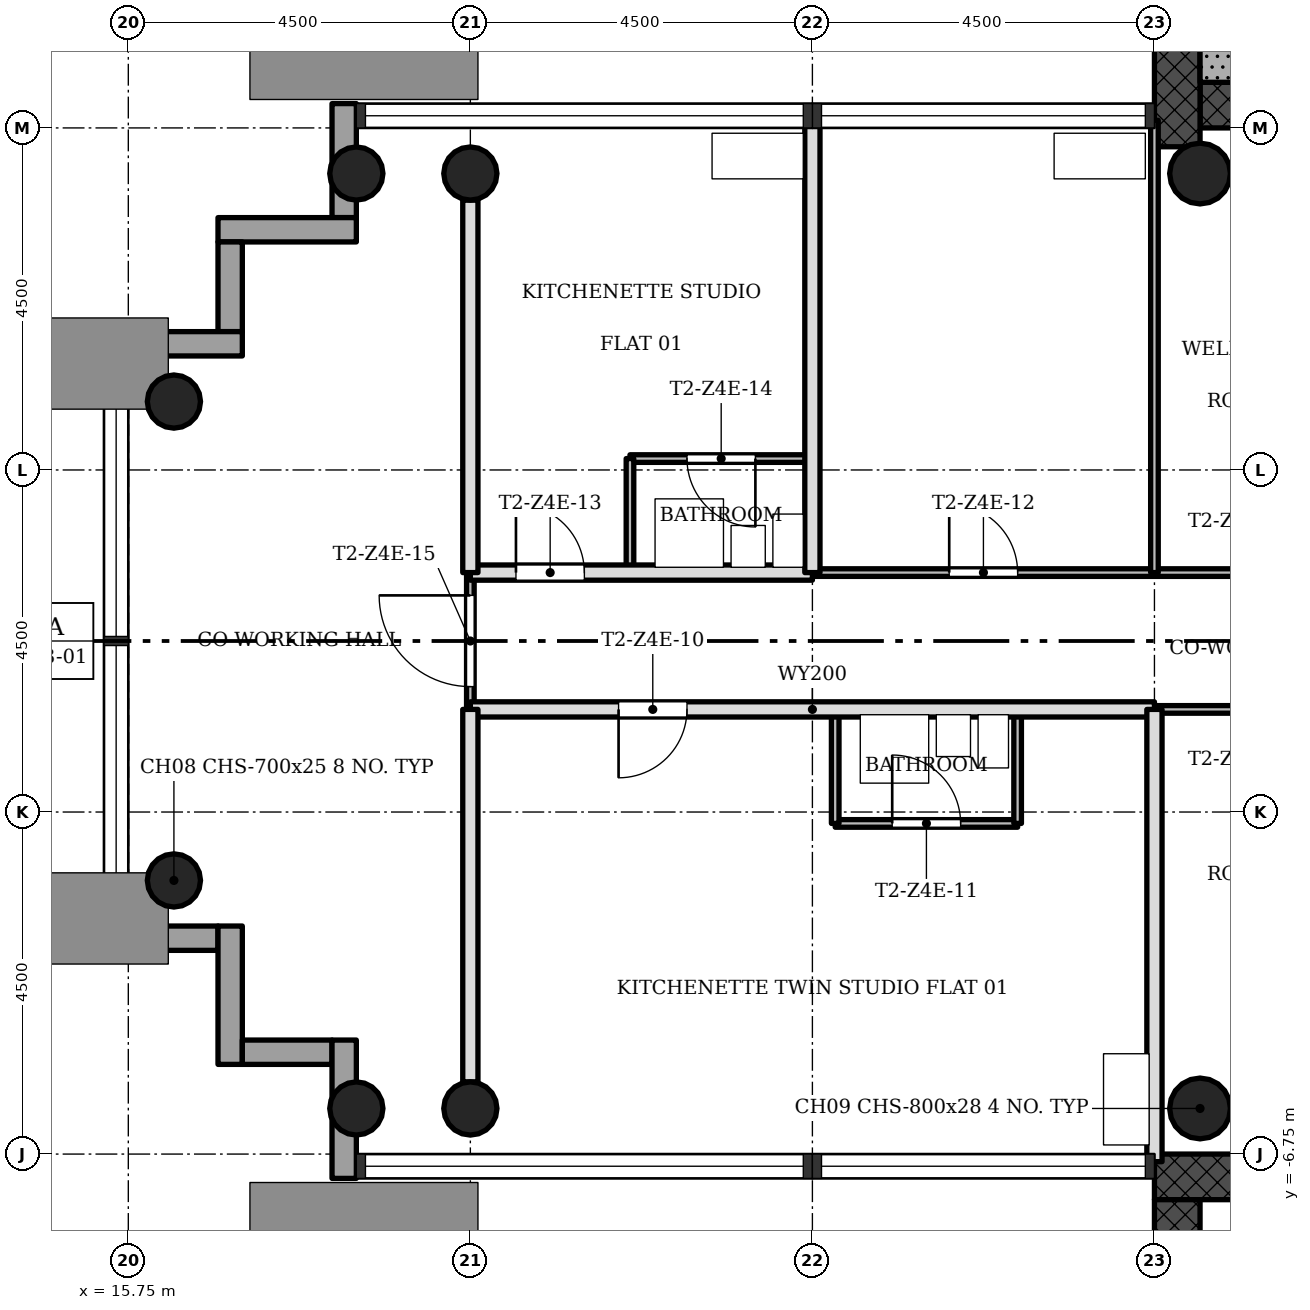
"""IFC4 building model, lengths in metres.
Left out: names, types, materials, properties, quantities, classifications, styles, units other than length and angle.
Written with IfcOpenShell. Run it as: python <this file> out.ifc"""

import sys

from ifc_helpers import new_model, si_unit, direction, frame, frame_2d, origin, origin_2d, place, context, subcontext, project, spatial, rectangle, hollow_circle, extrude, element, fill, save


model = new_model("IFC4")
c1 = context("Model", 3, precision=1e-05, world=origin(), true_north=direction((0.0, 1.0)))
c2 = subcontext(c1, "Body", "Model", "MODEL_VIEW")
j1 = project(units=[si_unit("LENGTHUNIT", "METRE"), si_unit("PLANEANGLEUNIT", "RADIAN")], contexts=[c1])
p1 = place(None, origin())
s1 = spatial("IfcSite", under=j1, at=p1, CompositionType="ELEMENT")
p2 = place(p1, origin())
s2 = spatial("IfcBuilding", under=s1, at=p2, CompositionType="ELEMENT")
p3 = place(p2, frame((0.0, 0.0, 209.6)))
s3 = spatial("IfcBuildingStorey", under=s2, at=p3, CompositionType="ELEMENT", Elevation=209.6)
p4 = place(p3, frame((29.85, 7.05, 0.0), z_axis=(0.0, 0.0, 1.0), x_axis=(1.0, 0.0, 0.0)))
e1 = element("IfcWall", 1, at=p4, inside=s3, PredefinedType="SHEAR", context=c2, shape_type="SweptSolid", body=[
    extrude(rectangle(XDim=12.9, YDim=0.6, at=frame_2d((6.45, 0.0))), origin(), (0.0, 0.0, 1.0), 3.4),
])
p5 = place(p4, frame((5.25, 0.0, 0.0)))
e2 = element("IfcOpeningElement", 2, at=p5, cuts=e1, PredefinedType="OPENING", context=c2, shape_type="SweptSolid", body=[
    extrude(rectangle(XDim=1.8, YDim=2.1, at=frame_2d((0.9, 1.05))), frame((0.0, 0.31, 0.0), z_axis=(0.0, -1.0, 0.0), x_axis=(1.0, 0.0, 0.0)), (0.0, 0.0, 1.0), 0.62),
])
p6 = place(p3, frame((29.55, 15.15, 0.0), z_axis=(0.0, 0.0, 1.0), x_axis=(0.0, -1.0, 0.0)))
e3 = element("IfcWall", 3, at=p6, inside=s3, PredefinedType="SHEAR", context=c2, shape_type="SweptSolid", body=[
    extrude(rectangle(XDim=8.648, YDim=0.6, at=frame_2d((4.324, 0.0))), origin(), (0.0, 0.0, 1.0), 3.4),
])
p7 = place(p3, frame((42.15, -7.05, 0.0), z_axis=(0.0, 0.0, 1.0), x_axis=(-1.0, 0.0, 0.0)))
e4 = element("IfcWall", 4, at=p7, inside=s3, PredefinedType="SHEAR", context=c2, shape_type="SweptSolid", body=[
    extrude(rectangle(XDim=12.9, YDim=0.6, at=frame_2d((6.45, 0.0))), origin(), (0.0, 0.0, 1.0), 3.4),
])
p8 = place(p7, frame((5.25, 0.0, 0.0)))
e5 = element("IfcOpeningElement", 5, at=p8, cuts=e4, PredefinedType="OPENING", context=c2, shape_type="SweptSolid", body=[
    extrude(rectangle(XDim=1.8, YDim=2.1, at=frame_2d((0.9, 1.05))), frame((0.0, 0.31, 0.0), z_axis=(0.0, -1.0, 0.0), x_axis=(1.0, 0.0, 0.0)), (0.0, 0.0, 1.0), 0.62),
])
p9 = place(p3, frame((29.55, -7.35, 0.0), z_axis=(0.0, 0.0, 1.0), x_axis=(0.0, -1.0, 0.0)))
e6 = element("IfcWall", 6, at=p9, inside=s3, PredefinedType="SHEAR", context=c2, shape_type="SweptSolid", body=[
    extrude(rectangle(XDim=8.4, YDim=0.6, at=frame_2d((4.2, 0.0))), origin(), (0.0, 0.0, 1.0), 3.4),
])
for number, where, z_axis, x_axis in (
    (7, (20.25, 6.15, 0.0), (0.0, 0.0, 1.0), (1.0, 0.0, 0.0)),
    (8, (20.25, -6.15, 0.0), (0.0, 0.0, 1.0), (1.0, 0.0, 0.0)),
    (9, (18.75, 6.15, 0.0), (0.0, 0.0, 1.0), (1.0, 0.0, 0.0)),
    (10, (18.75, -6.15, 0.0), (0.0, 0.0, 1.0), (1.0, 0.0, 0.0)),
    (11, (16.35, 3.15, 0.0), (0.0, 0.0, 1.0), (1.0, 0.0, 0.0)),
    (12, (16.35, -3.15, 0.0), (0.0, 0.0, 1.0), (1.0, 0.0, 0.0)),
):
    element("IfcColumn", number, at=place(p3, frame(where, z_axis=z_axis, x_axis=x_axis)), inside=s3, PredefinedType="COLUMN", context=c2, shape_type="SweptSolid", body=[
        extrude(hollow_circle(Radius=0.35, WallThickness=0.025, at=origin_2d()), origin(), (0.0, 0.0, 1.0), 3.4),
    ])
for number, where, z_axis, x_axis in (
    (13, (29.85, 6.15, 0.0), (0.0, 0.0, 1.0), (1.0, 0.0, 0.0)),
    (14, (29.85, -6.15, 0.0), (0.0, 0.0, 1.0), (1.0, 0.0, 0.0)),
):
    element("IfcColumn", number, at=place(p3, frame(where, z_axis=z_axis, x_axis=x_axis)), inside=s3, PredefinedType="COLUMN", context=c2, shape_type="SweptSolid", body=[
        extrude(hollow_circle(Radius=0.4, WallThickness=0.028, at=origin_2d()), origin(), (0.0, 0.0, 1.0), 3.4),
    ])
p10 = place(p3, frame((18.59, 7.07, -0.3), z_axis=(0.0, 0.0, 1.0), x_axis=(0.0, -1.0, 0.0)))
e15 = element("IfcWall", 15, at=p10, inside=s3, PredefinedType="STANDARD", context=c2, shape_type="SweptSolid", body=[
    extrude(rectangle(XDim=1.5, YDim=0.32, at=frame_2d((0.75, 0.0))), origin(), (0.0, 0.0, 1.0), 3.4),
])
p11 = place(p3, frame((18.75, 5.41, -0.3), z_axis=(0.0, 0.0, 1.0), x_axis=(-1.0, 0.0, 0.0)))
e16 = element("IfcWall", 16, at=p11, inside=s3, PredefinedType="STANDARD", context=c2, shape_type="SweptSolid", body=[
    extrude(rectangle(XDim=1.82, YDim=0.32, at=frame_2d((0.91, 0.0))), origin(), (0.0, 0.0, 1.0), 3.4),
])
p12 = place(p3, frame((17.09, 5.25, -0.3), z_axis=(0.0, 0.0, 1.0), x_axis=(0.0, -1.0, 0.0)))
e17 = element("IfcWall", 17, at=p12, inside=s3, PredefinedType="STANDARD", context=c2, shape_type="SweptSolid", body=[
    extrude(rectangle(XDim=1.18, YDim=0.32, at=frame_2d((0.59, 0.0))), origin(), (0.0, 0.0, 1.0), 3.4),
])
p13 = place(p3, frame((17.25, 3.91, -0.3), z_axis=(0.0, 0.0, 1.0), x_axis=(-1.0, 0.0, 0.0)))
e18 = element("IfcWall", 18, at=p13, inside=s3, PredefinedType="STANDARD", context=c2, shape_type="SweptSolid", body=[
    extrude(rectangle(XDim=1.82, YDim=0.32, at=frame_2d((0.91, 0.0))), origin(), (0.0, 0.0, 1.0), 3.4),
])
p14 = place(p3, frame((15.43, -3.91, -0.3), z_axis=(0.0, 0.0, 1.0), x_axis=(1.0, 0.0, 0.0)))
e19 = element("IfcWall", 19, at=p14, inside=s3, PredefinedType="STANDARD", context=c2, shape_type="SweptSolid", body=[
    extrude(rectangle(XDim=1.5, YDim=0.32, at=frame_2d((0.75, 0.0))), origin(), (0.0, 0.0, 1.0), 3.4),
])
p15 = place(p3, frame((17.09, -3.75, -0.3), z_axis=(0.0, 0.0, 1.0), x_axis=(0.0, -1.0, 0.0)))
e20 = element("IfcWall", 20, at=p15, inside=s3, PredefinedType="STANDARD", context=c2, shape_type="SweptSolid", body=[
    extrude(rectangle(XDim=1.82, YDim=0.32, at=frame_2d((0.91, 0.0))), origin(), (0.0, 0.0, 1.0), 3.4),
])
p16 = place(p3, frame((17.25, -5.41, -0.3), z_axis=(0.0, 0.0, 1.0), x_axis=(1.0, 0.0, 0.0)))
e21 = element("IfcWall", 21, at=p16, inside=s3, PredefinedType="STANDARD", context=c2, shape_type="SweptSolid", body=[
    extrude(rectangle(XDim=1.18, YDim=0.32, at=frame_2d((0.59, 0.0))), origin(), (0.0, 0.0, 1.0), 3.4),
])
p17 = place(p3, frame((18.59, -5.25, -0.3), z_axis=(0.0, 0.0, 1.0), x_axis=(0.0, -1.0, 0.0)))
e22 = element("IfcWall", 22, at=p17, inside=s3, PredefinedType="STANDARD", context=c2, shape_type="SweptSolid", body=[
    extrude(rectangle(XDim=1.82, YDim=0.32, at=frame_2d((0.91, 0.0))), origin(), (0.0, 0.0, 1.0), 3.4),
])
p18 = place(p3, frame((27.45, -2.4, 0.0), z_axis=(0.0, 0.0, 1.0), x_axis=(-1.0, 0.0, 0.0)))
e23 = element("IfcWall", 23, at=p18, inside=s3, PredefinedType="PARTITIONING", context=c2, shape_type="SweptSolid", body=[
    extrude(rectangle(XDim=2.4, YDim=0.1, at=frame_2d((1.2, 0.0))), origin(), (0.0, 0.0, 1.0), 3.0),
])
p19 = place(p18, frame((0.75, 0.0, 0.0)))
e24 = element("IfcOpeningElement", 24, at=p19, cuts=e23, PredefinedType="OPENING", context=c2, shape_type="SweptSolid", body=[
    extrude(rectangle(XDim=0.9, YDim=2.1, at=frame_2d((0.45, 1.05))), frame((0.0, 0.06, 0.0), z_axis=(0.0, -1.0, 0.0), x_axis=(1.0, 0.0, 0.0)), (0.0, 0.0, 1.0), 0.12),
])
p20 = place(p3, frame((31.5, -0.9, 0.0), z_axis=(0.0, 0.0, 1.0), x_axis=(-1.0, 0.0, 0.0)))
e25 = element("IfcWall", 25, at=p20, inside=s3, PredefinedType="PARTITIONING", context=c2, shape_type="SweptSolid", body=[
    extrude(rectangle(XDim=2.25, YDim=0.1, at=frame_2d((1.125, 0.0))), origin(), (0.0, 0.0, 1.0), 3.0),
])
p21 = place(p3, frame((29.25, -0.9, 0.0), z_axis=(0.0, 0.0, 1.0), x_axis=(-1.0, 0.0, 0.0)))
e26 = element("IfcWall", 26, at=p21, inside=s3, PredefinedType="SOLIDWALL", context=c2, shape_type="SweptSolid", body=[
    extrude(rectangle(XDim=9.0, YDim=0.2, at=frame_2d((4.5, 0.0))), origin(), (0.0, 0.0, 1.0), 3.0),
])
p22 = place(p21, frame((6.15, 0.0, 0.0)))
e27 = element("IfcOpeningElement", 27, at=p22, cuts=e26, PredefinedType="OPENING", context=c2, shape_type="SweptSolid", body=[
    extrude(rectangle(XDim=0.9, YDim=2.1, at=frame_2d((0.45, 1.05))), frame((0.0, 0.11, 0.0), z_axis=(0.0, -1.0, 0.0), x_axis=(1.0, 0.0, 0.0)), (0.0, 0.0, 1.0), 0.22),
])
p23 = place(p3, frame((31.5, 0.9, 0.0), z_axis=(0.0, 0.0, 1.0), x_axis=(-1.0, 0.0, 0.0)))
e28 = element("IfcWall", 28, at=p23, inside=s3, PredefinedType="PARTITIONING", context=c2, shape_type="SweptSolid", body=[
    extrude(rectangle(XDim=6.75, YDim=0.1, at=frame_2d((3.375, 0.0))), origin(), (0.0, 0.0, 1.0), 3.0),
])
p24 = place(p23, frame((4.05, 0.0, 0.0)))
e29 = element("IfcOpeningElement", 29, at=p24, cuts=e28, PredefinedType="OPENING", context=c2, shape_type="SweptSolid", body=[
    extrude(rectangle(XDim=0.9, YDim=2.1, at=frame_2d((0.45, 1.05))), frame((0.0, 0.06, 0.0), z_axis=(0.0, -1.0, 0.0), x_axis=(1.0, 0.0, 0.0)), (0.0, 0.0, 1.0), 0.12),
])
p25 = place(p3, frame((24.75, 0.9, 0.0), z_axis=(0.0, 0.0, 1.0), x_axis=(-1.0, 0.0, 0.0)))
e30 = element("IfcWall", 30, at=p25, inside=s3, PredefinedType="SOLIDWALL", context=c2, shape_type="SweptSolid", body=[
    extrude(rectangle(XDim=4.5, YDim=0.2, at=frame_2d((2.25, 0.0))), origin(), (0.0, 0.0, 1.0), 3.0),
])
p26 = place(p25, frame((3.0, 0.0, 0.0)))
e31 = element("IfcOpeningElement", 31, at=p26, cuts=e30, PredefinedType="OPENING", context=c2, shape_type="SweptSolid", body=[
    extrude(rectangle(XDim=0.9, YDim=2.1, at=frame_2d((0.45, 1.05))), frame((0.0, 0.11, 0.0), z_axis=(0.0, -1.0, 0.0), x_axis=(1.0, 0.0, 0.0)), (0.0, 0.0, 1.0), 0.22),
])
p27 = place(p3, frame((24.75, 2.4, 0.0), z_axis=(0.0, 0.0, 1.0), x_axis=(-1.0, 0.0, 0.0)))
e32 = element("IfcWall", 32, at=p27, inside=s3, PredefinedType="PARTITIONING", context=c2, shape_type="SweptSolid", body=[
    extrude(rectangle(XDim=2.4, YDim=0.1, at=frame_2d((1.2, 0.0))), origin(), (0.0, 0.0, 1.0), 3.0),
])
p28 = place(p27, frame((0.75, 0.0, 0.0)))
e33 = element("IfcOpeningElement", 33, at=p28, cuts=e32, PredefinedType="OPENING", context=c2, shape_type="SweptSolid", body=[
    extrude(rectangle(XDim=0.9, YDim=2.1, at=frame_2d((0.45, 1.05))), frame((0.0, 0.06, 0.0), z_axis=(0.0, -1.0, 0.0), x_axis=(1.0, 0.0, 0.0)), (0.0, 0.0, 1.0), 0.12),
])
p29 = place(p3, frame((29.25, 0.9, 0.0), z_axis=(0.0, 0.0, 1.0), x_axis=(0.0, 1.0, 0.0)))
e34 = element("IfcWall", 34, at=p29, inside=s3, PredefinedType="PARTITIONING", context=c2, shape_type="SweptSolid", body=[
    extrude(rectangle(XDim=5.95, YDim=0.1, at=frame_2d((2.975, 0.0))), origin(), (0.0, 0.0, 1.0), 3.0),
])
p30 = place(p3, frame((29.25, -6.85, 0.0), z_axis=(0.0, 0.0, 1.0), x_axis=(0.0, 1.0, 0.0)))
e35 = element("IfcWall", 35, at=p30, inside=s3, PredefinedType="SOLIDWALL", context=c2, shape_type="SweptSolid", body=[
    extrude(rectangle(XDim=5.95, YDim=0.2, at=frame_2d((2.975, 0.0))), origin(), (0.0, 0.0, 1.0), 3.0),
])
for number, where, z_axis, x_axis in (
    (36, (27.45, -2.4, 0.0), (0.0, 0.0, 1.0), (0.0, 1.0, 0.0)),
    (37, (25.05, -2.4, 0.0), (0.0, 0.0, 1.0), (0.0, 1.0, 0.0)),
):
    element("IfcWall", number, at=place(p3, frame(where, z_axis=z_axis, x_axis=x_axis)), inside=s3, PredefinedType="PARTITIONING", context=c2, shape_type="SweptSolid", body=[
        extrude(rectangle(XDim=1.5, YDim=0.1, at=frame_2d((0.75, 0.0))), origin(), (0.0, 0.0, 1.0), 3.0),
    ])
p31 = place(p3, frame((24.75, 0.9, 0.0), z_axis=(0.0, 0.0, 1.0), x_axis=(0.0, 1.0, 0.0)))
e38 = element("IfcWall", 38, at=p31, inside=s3, PredefinedType="SOLIDWALL", context=c2, shape_type="SweptSolid", body=[
    extrude(rectangle(XDim=5.95, YDim=0.2, at=frame_2d((2.975, 0.0))), origin(), (0.0, 0.0, 1.0), 3.0),
])
p32 = place(p3, frame((22.35, 0.9, 0.0), z_axis=(0.0, 0.0, 1.0), x_axis=(0.0, 1.0, 0.0)))
e39 = element("IfcWall", 39, at=p32, inside=s3, PredefinedType="PARTITIONING", context=c2, shape_type="SweptSolid", body=[
    extrude(rectangle(XDim=1.5, YDim=0.1, at=frame_2d((0.75, 0.0))), origin(), (0.0, 0.0, 1.0), 3.0),
])
p33 = place(p3, frame((20.25, -0.9, 0.0), z_axis=(0.0, 0.0, 1.0), x_axis=(0.0, 1.0, 0.0)))
e40 = element("IfcWall", 40, at=p33, inside=s3, PredefinedType="PARTITIONING", context=c2, shape_type="SweptSolid", body=[
    extrude(rectangle(XDim=1.8, YDim=0.1, at=frame_2d((0.9, 0.0))), origin(), (0.0, 0.0, 1.0), 3.0),
])
p34 = place(p33, frame((0.3, 0.0, 0.0)))
e41 = element("IfcOpeningElement", 41, at=p34, cuts=e40, PredefinedType="OPENING", context=c2, shape_type="SweptSolid", body=[
    extrude(rectangle(XDim=1.2, YDim=2.1, at=frame_2d((0.6, 1.05))), frame((0.0, 0.06, 0.0), z_axis=(0.0, -1.0, 0.0), x_axis=(1.0, 0.0, 0.0)), (0.0, 0.0, 1.0), 0.12),
])
for number, where, z_axis, x_axis in (
    (42, (20.25, -5.8, 0.0), (0.0, 0.0, 1.0), (0.0, 1.0, 0.0)),
    (43, (20.25, 0.9, 0.0), (0.0, 0.0, 1.0), (0.0, 1.0, 0.0)),
):
    element("IfcWall", number, at=place(p3, frame(where, z_axis=z_axis, x_axis=x_axis)), inside=s3, PredefinedType="SOLIDWALL", context=c2, shape_type="SweptSolid", body=[
        extrude(rectangle(XDim=4.9, YDim=0.2, at=frame_2d((2.45, 0.0))), origin(), (0.0, 0.0, 1.0), 3.0),
    ])
p35 = place(p3, frame((34.15, 7.65, 0.0), z_axis=(0.0, 0.0, 1.0), x_axis=(-1.0, 0.0, 0.0)))
e44 = element("IfcWall", 44, at=p35, inside=s3, PredefinedType="SHEAR", context=c2, shape_type="SweptSolid", body=[
    extrude(rectangle(XDim=4.3, YDim=0.6, at=frame_2d((2.15, 0.0))), origin(), (0.0, 0.0, 1.0), 3.4),
])
p36 = place(p22, origin())
e45 = element("IfcDoor", 45, at=p36, inside=s3, OperationType="SINGLE_SWING_LEFT", PredefinedType="DOOR", context=c2, shape_type="SweptSolid", body=[
    extrude(rectangle(XDim=0.9, YDim=2.1, at=frame_2d((0.45, 1.05))), frame((0.0, 0.025, 0.0), z_axis=(0.0, -1.0, 0.0), x_axis=(1.0, 0.0, 0.0)), (0.0, 0.0, 1.0), 0.05),
])
fill(e27, e45)
p37 = place(p19, origin())
e46 = element("IfcDoor", 46, at=p37, inside=s3, OperationType="SINGLE_SWING_RIGHT", PredefinedType="DOOR", context=c2, shape_type="SweptSolid", body=[
    extrude(rectangle(XDim=0.9, YDim=2.1, at=frame_2d((0.45, 1.05))), frame((0.0, 0.025, 0.0), z_axis=(0.0, -1.0, 0.0), x_axis=(1.0, 0.0, 0.0)), (0.0, 0.0, 1.0), 0.05),
])
fill(e24, e46)
p38 = place(p24, origin())
e47 = element("IfcDoor", 47, at=p38, inside=s3, OperationType="SINGLE_SWING_RIGHT", PredefinedType="DOOR", context=c2, shape_type="SweptSolid", body=[
    extrude(rectangle(XDim=0.9, YDim=2.1, at=frame_2d((0.45, 1.05))), frame((0.0, 0.025, 0.0), z_axis=(0.0, -1.0, 0.0), x_axis=(1.0, 0.0, 0.0)), (0.0, 0.0, 1.0), 0.05),
])
fill(e29, e47)
p39 = place(p26, origin())
e48 = element("IfcDoor", 48, at=p39, inside=s3, OperationType="SINGLE_SWING_RIGHT", PredefinedType="DOOR", context=c2, shape_type="SweptSolid", body=[
    extrude(rectangle(XDim=0.9, YDim=2.1, at=frame_2d((0.45, 1.05))), frame((0.0, 0.025, 0.0), z_axis=(0.0, -1.0, 0.0), x_axis=(1.0, 0.0, 0.0)), (0.0, 0.0, 1.0), 0.05),
])
fill(e31, e48)
p40 = place(p28, origin())
e49 = element("IfcDoor", 49, at=p40, inside=s3, OperationType="SINGLE_SWING_RIGHT", PredefinedType="DOOR", context=c2, shape_type="SweptSolid", body=[
    extrude(rectangle(XDim=0.9, YDim=2.1, at=frame_2d((0.45, 1.05))), frame((0.0, 0.025, 0.0), z_axis=(0.0, -1.0, 0.0), x_axis=(1.0, 0.0, 0.0)), (0.0, 0.0, 1.0), 0.05),
])
fill(e33, e49)
p41 = place(p34, origin())
e50 = element("IfcDoor", 50, at=p41, inside=s3, OperationType="SINGLE_SWING_LEFT", PredefinedType="DOOR", context=c2, shape_type="SweptSolid", body=[
    extrude(rectangle(XDim=1.2, YDim=2.1, at=frame_2d((0.6, 1.05))), frame((0.0, 0.025, 0.0), z_axis=(0.0, -1.0, 0.0), x_axis=(1.0, 0.0, 0.0)), (0.0, 0.0, 1.0), 0.05),
])
fill(e41, e50)
save(model, sys.argv[1])
